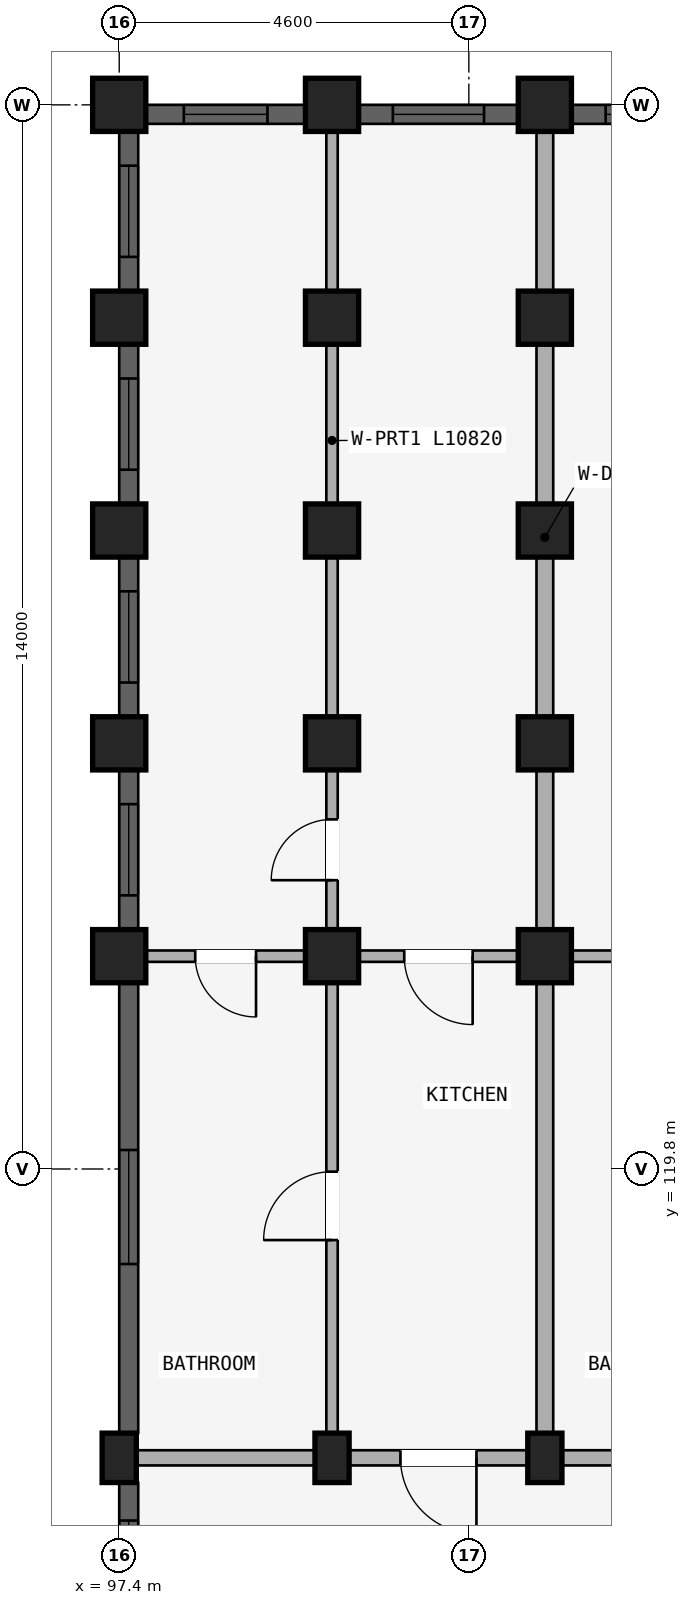
"""IFC4 building model, lengths in metres.
Left out: names, types, materials, properties, quantities, classifications, styles, units other than length and angle.
Written with IfcOpenShell. Run it as: python <this file> out.ifc"""

import sys

from ifc_helpers import new_model, si_unit, direction, frame, frame_2d, origin, origin_2d, place, context, subcontext, project, spatial, rectangle, extrude, element, fill, save


model = new_model("IFC4")
c1 = context("Model", 3, precision=1e-05, world=origin(), true_north=direction((0.0, 1.0)))
c2 = subcontext(c1, "Body", "Model", "MODEL_VIEW")
j1 = project(units=[si_unit("LENGTHUNIT", "METRE"), si_unit("PLANEANGLEUNIT", "RADIAN")], contexts=[c1])
p1 = place(None, origin())
s1 = spatial("IfcSite", under=j1, at=p1, CompositionType="ELEMENT")
p2 = place(p1, origin())
s2 = spatial("IfcBuilding", under=s1, at=p2, CompositionType="ELEMENT")
p3 = place(p2, frame((0.0, 0.0, 27.6)))
s3 = spatial("IfcBuildingStorey", under=s2, at=p3, CompositionType="ELEMENT", Elevation=27.6)
p4 = place(p3, frame((103.0, 116.0, 0.0), z_axis=(0.0, 0.0, 1.0), x_axis=(1.0, 0.0, 0.0)))
e1 = element("IfcColumn", 1, at=p4, inside=s3, PredefinedType="COLUMN", context=c2, shape_type="SweptSolid", body=[
    extrude(rectangle(XDim=0.45, YDim=0.65, at=origin_2d()), origin(), (0.0, 0.0, 1.0), 2.93),
])
for number, where, z_axis, x_axis in (
    (2, (103.0, 122.6, 0.0), (0.0, 0.0, 1.0), (1.0, 0.0, 0.0)),
    (3, (103.0, 125.4, 0.0), (0.0, 0.0, 1.0), (1.0, 0.0, 0.0)),
    (4, (103.0, 128.2, 0.0), (0.0, 0.0, 1.0), (1.0, 0.0, 0.0)),
    (5, (103.0, 131.0, 0.0), (0.0, 0.0, 1.0), (1.0, 0.0, 0.0)),
):
    element("IfcColumn", number, at=place(p3, frame(where, z_axis=z_axis, x_axis=x_axis)), inside=s3, PredefinedType="COLUMN", context=c2, shape_type="SweptSolid", body=[
        extrude(rectangle(XDim=0.7, YDim=0.7, at=origin_2d()), origin(), (0.0, 0.0, 1.0), 2.93),
    ])
p5 = place(p3, frame((103.0, 133.8, 0.0), z_axis=(0.0, 0.0, 1.0), x_axis=(1.0, 0.0, 0.0)))
e6 = element("IfcColumn", 6, at=p5, inside=s3, PredefinedType="COLUMN", context=c2, shape_type="SweptSolid", body=[
    extrude(rectangle(XDim=0.7, YDim=0.7, at=origin_2d()), origin(), (0.0, 0.0, 1.0), 2.97),
])
p6 = place(p3, frame((100.2, 116.0, 0.0), z_axis=(0.0, 0.0, 1.0), x_axis=(1.0, 0.0, 0.0)))
e7 = element("IfcColumn", 7, at=p6, inside=s3, PredefinedType="COLUMN", context=c2, shape_type="SweptSolid", body=[
    extrude(rectangle(XDim=0.45, YDim=0.65, at=origin_2d()), origin(), (0.0, 0.0, 1.0), 2.93),
])
for number, where, z_axis, x_axis in (
    (8, (100.2, 122.6, 0.0), (0.0, 0.0, 1.0), (1.0, 0.0, 0.0)),
    (9, (100.2, 125.4, 0.0), (0.0, 0.0, 1.0), (1.0, 0.0, 0.0)),
    (10, (100.2, 128.2, 0.0), (0.0, 0.0, 1.0), (1.0, 0.0, 0.0)),
    (11, (100.2, 131.0, 0.0), (0.0, 0.0, 1.0), (1.0, 0.0, 0.0)),
):
    element("IfcColumn", number, at=place(p3, frame(where, z_axis=z_axis, x_axis=x_axis)), inside=s3, PredefinedType="COLUMN", context=c2, shape_type="SweptSolid", body=[
        extrude(rectangle(XDim=0.7, YDim=0.7, at=origin_2d()), origin(), (0.0, 0.0, 1.0), 2.93),
    ])
p7 = place(p3, frame((100.2, 133.8, 0.0), z_axis=(0.0, 0.0, 1.0), x_axis=(1.0, 0.0, 0.0)))
e12 = element("IfcColumn", 12, at=p7, inside=s3, PredefinedType="COLUMN", context=c2, shape_type="SweptSolid", body=[
    extrude(rectangle(XDim=0.7, YDim=0.7, at=origin_2d()), origin(), (0.0, 0.0, 1.0), 2.97),
])
p8 = place(p3, frame((97.4, 116.0, 0.0), z_axis=(0.0, 0.0, 1.0), x_axis=(1.0, 0.0, 0.0)))
e13 = element("IfcColumn", 13, at=p8, inside=s3, PredefinedType="COLUMN", context=c2, shape_type="SweptSolid", body=[
    extrude(rectangle(XDim=0.45, YDim=0.65, at=origin_2d()), origin(), (0.0, 0.0, 1.0), 2.93),
])
for number, where, z_axis, x_axis in (
    (14, (97.4, 122.6, 0.0), (0.0, 0.0, 1.0), (1.0, 0.0, 0.0)),
    (15, (97.4, 125.4, 0.0), (0.0, 0.0, 1.0), (1.0, 0.0, 0.0)),
    (16, (97.4, 128.2, 0.0), (0.0, 0.0, 1.0), (1.0, 0.0, 0.0)),
    (17, (97.4, 131.0, 0.0), (0.0, 0.0, 1.0), (1.0, 0.0, 0.0)),
):
    element("IfcColumn", number, at=place(p3, frame(where, z_axis=z_axis, x_axis=x_axis)), inside=s3, PredefinedType="COLUMN", context=c2, shape_type="SweptSolid", body=[
        extrude(rectangle(XDim=0.7, YDim=0.7, at=origin_2d()), origin(), (0.0, 0.0, 1.0), 2.93),
    ])
p9 = place(p3, frame((97.4, 133.8, 0.0), z_axis=(0.0, 0.0, 1.0), x_axis=(1.0, 0.0, 0.0)))
e18 = element("IfcColumn", 18, at=p9, inside=s3, PredefinedType="COLUMN", context=c2, shape_type="SweptSolid", body=[
    extrude(rectangle(XDim=0.7, YDim=0.7, at=origin_2d()), origin(), (0.0, 0.0, 1.0), 2.97),
])
p10 = place(p3, frame((105.8, 116.0, 0.0), z_axis=(0.0, 0.0, 1.0), x_axis=(-1.0, 0.0, 0.0)))
e19 = element("IfcWall", 19, at=p10, inside=s3, PredefinedType="STANDARD", context=c2, shape_type="SweptSolid", body=[
    extrude(rectangle(XDim=2.8, YDim=0.2, at=frame_2d((1.4, 0.0))), origin(), (0.0, 0.0, 1.0), 2.372),
])
p11 = place(p3, frame((105.72, 122.6, 0.0), z_axis=(0.0, 0.0, 1.0), x_axis=(-1.0, 0.0, 0.0)))
e20 = element("IfcWall", 20, at=p11, inside=s3, PredefinedType="PLUMBINGWALL", context=c2, shape_type="SweptSolid", body=[
    extrude(rectangle(XDim=2.64, YDim=0.15, at=frame_2d((1.32, 0.0))), origin(), (0.0, 0.0, 1.0), 2.372),
])
p12 = place(p11, frame((0.92, 0.0, 0.0)))
e21 = element("IfcOpeningElement", 21, at=p12, cuts=e20, PredefinedType="OPENING", context=c2, shape_type="SweptSolid", body=[
    extrude(rectangle(XDim=0.8, YDim=2.1, at=frame_2d((0.4, 1.05))), frame((0.0, 0.085, 0.0), z_axis=(0.0, -1.0, 0.0), x_axis=(1.0, 0.0, 0.0)), (0.0, 0.0, 1.0), 0.17),
])
p13 = place(p3, frame((103.0, 116.0, 0.0), z_axis=(0.0, 0.0, 1.0), x_axis=(-1.0, 0.0, 0.0)))
e22 = element("IfcWall", 22, at=p13, inside=s3, PredefinedType="STANDARD", context=c2, shape_type="SweptSolid", body=[
    extrude(rectangle(XDim=2.8, YDim=0.2, at=frame_2d((1.4, 0.0))), origin(), (0.0, 0.0, 1.0), 2.372),
])
p14 = place(p13, frame((0.9, 0.0, 0.0)))
e23 = element("IfcOpeningElement", 23, at=p14, cuts=e22, PredefinedType="OPENING", context=c2, shape_type="SweptSolid", body=[
    extrude(rectangle(XDim=1.0, YDim=2.15, at=frame_2d((0.5, 1.075))), frame((0.0, 0.11, 0.0), z_axis=(0.0, -1.0, 0.0), x_axis=(1.0, 0.0, 0.0)), (0.0, 0.0, 1.0), 0.22),
])
p15 = place(p3, frame((102.92, 122.6, 0.0), z_axis=(0.0, 0.0, 1.0), x_axis=(-1.0, 0.0, 0.0)))
e24 = element("IfcWall", 24, at=p15, inside=s3, PredefinedType="PLUMBINGWALL", context=c2, shape_type="SweptSolid", body=[
    extrude(rectangle(XDim=2.64, YDim=0.15, at=frame_2d((1.32, 0.0))), origin(), (0.0, 0.0, 1.0), 2.372),
])
p16 = place(p15, frame((0.87, 0.0, 0.0)))
e25 = element("IfcOpeningElement", 25, at=p16, cuts=e24, PredefinedType="OPENING", context=c2, shape_type="SweptSolid", body=[
    extrude(rectangle(XDim=0.9, YDim=2.1, at=frame_2d((0.45, 1.05))), frame((0.0, 0.085, 0.0), z_axis=(0.0, -1.0, 0.0), x_axis=(1.0, 0.0, 0.0)), (0.0, 0.0, 1.0), 0.17),
])
p17 = place(p3, frame((100.2, 116.0, 0.0), z_axis=(0.0, 0.0, 1.0), x_axis=(-1.0, 0.0, 0.0)))
e26 = element("IfcWall", 26, at=p17, inside=s3, PredefinedType="STANDARD", context=c2, shape_type="SweptSolid", body=[
    extrude(rectangle(XDim=2.8, YDim=0.2, at=frame_2d((1.4, 0.0))), origin(), (0.0, 0.0, 1.0), 2.372),
])
p18 = place(p3, frame((100.12, 122.6, 0.0), z_axis=(0.0, 0.0, 1.0), x_axis=(-1.0, 0.0, 0.0)))
e27 = element("IfcWall", 27, at=p18, inside=s3, PredefinedType="PLUMBINGWALL", context=c2, shape_type="SweptSolid", body=[
    extrude(rectangle(XDim=2.64, YDim=0.15, at=frame_2d((1.32, 0.0))), origin(), (0.0, 0.0, 1.0), 2.372),
])
p19 = place(p18, frame((0.92, 0.0, 0.0)))
e28 = element("IfcOpeningElement", 28, at=p19, cuts=e27, PredefinedType="OPENING", context=c2, shape_type="SweptSolid", body=[
    extrude(rectangle(XDim=0.8, YDim=2.1, at=frame_2d((0.4, 1.05))), frame((0.0, 0.085, 0.0), z_axis=(0.0, -1.0, 0.0), x_axis=(1.0, 0.0, 0.0)), (0.0, 0.0, 1.0), 0.17),
])
p20 = place(p3, frame((103.0, 116.05, 0.0), z_axis=(0.0, 0.0, 1.0), x_axis=(0.0, 1.0, 0.0)))
e29 = element("IfcWall", 29, at=p20, inside=s3, PredefinedType="STANDARD", context=c2, shape_type="SweptSolid", body=[
    extrude(rectangle(XDim=6.53, YDim=0.22, at=frame_2d((3.265, 0.0))), origin(), (0.0, 0.0, 1.0), 2.372),
])
p21 = place(p3, frame((103.0, 122.7, 0.0), z_axis=(0.0, 0.0, 1.0), x_axis=(0.0, 1.0, 0.0)))
e30 = element("IfcWall", 30, at=p21, inside=s3, PredefinedType="STANDARD", context=c2, shape_type="SweptSolid", body=[
    extrude(rectangle(XDim=10.82, YDim=0.22, at=frame_2d((5.41, 0.0))), origin(), (0.0, 0.0, 1.0), 2.372),
])
p22 = place(p3, frame((100.2, 116.05, 0.0), z_axis=(0.0, 0.0, 1.0), x_axis=(0.0, 1.0, 0.0)))
e31 = element("IfcWall", 31, at=p22, inside=s3, PredefinedType="PARTITIONING", context=c2, shape_type="SweptSolid", body=[
    extrude(rectangle(XDim=6.53, YDim=0.15, at=frame_2d((3.265, 0.0))), origin(), (0.0, 0.0, 1.0), 2.372),
])
p23 = place(p22, frame((2.815, 0.0, 0.0)))
e32 = element("IfcOpeningElement", 32, at=p23, cuts=e31, PredefinedType="OPENING", context=c2, shape_type="SweptSolid", body=[
    extrude(rectangle(XDim=0.9, YDim=2.1, at=frame_2d((0.45, 1.05))), frame((0.0, 0.085, 0.0), z_axis=(0.0, -1.0, 0.0), x_axis=(1.0, 0.0, 0.0)), (0.0, 0.0, 1.0), 0.17),
])
p24 = place(p3, frame((100.2, 122.7, 0.0), z_axis=(0.0, 0.0, 1.0), x_axis=(0.0, 1.0, 0.0)))
e33 = element("IfcWall", 33, at=p24, inside=s3, PredefinedType="PARTITIONING", context=c2, shape_type="SweptSolid", body=[
    extrude(rectangle(XDim=10.82, YDim=0.15, at=frame_2d((5.41, 0.0))), origin(), (0.0, 0.0, 1.0), 2.372),
])
p25 = place(p24, frame((0.899, 0.0, 0.0)))
e34 = element("IfcOpeningElement", 34, at=p25, cuts=e33, PredefinedType="OPENING", context=c2, shape_type="SweptSolid", body=[
    extrude(rectangle(XDim=0.8, YDim=2.1, at=frame_2d((0.4, 1.05))), frame((0.0, 0.085, 0.0), z_axis=(0.0, -1.0, 0.0), x_axis=(1.0, 0.0, 0.0)), (0.0, 0.0, 1.0), 0.17),
])
p26 = place(p3, frame((105.447, 133.675, 0.0), z_axis=(0.0, 0.0, 1.0), x_axis=(-1.0, 0.0, 0.0)))
e35 = element("IfcWall", 35, at=p26, inside=s3, PredefinedType="STANDARD", context=c2, shape_type="SweptSolid", body=[
    extrude(rectangle(XDim=2.093, YDim=0.25, at=frame_2d((1.046, 0.0))), origin(), (0.0, 0.0, 1.0), 2.48),
])
p27 = place(p26, frame((0.447, 0.0, 0.78)))
e36 = element("IfcOpeningElement", 36, at=p27, cuts=e35, PredefinedType="OPENING", context=c2, shape_type="SweptSolid", body=[
    extrude(rectangle(XDim=1.2, YDim=1.5, at=frame_2d((0.6, 0.75))), frame((0.0, 0.135, 0.0), z_axis=(0.0, -1.0, 0.0), x_axis=(1.0, 0.0, 0.0)), (0.0, 0.0, 1.0), 0.27),
])
p28 = place(p3, frame((102.646, 133.675, 0.0), z_axis=(0.0, 0.0, 1.0), x_axis=(-1.0, 0.0, 0.0)))
e37 = element("IfcWall", 37, at=p28, inside=s3, PredefinedType="STANDARD", context=c2, shape_type="SweptSolid", body=[
    extrude(rectangle(XDim=2.093, YDim=0.25, at=frame_2d((1.046, 0.0))), origin(), (0.0, 0.0, 1.0), 2.48),
])
p29 = place(p28, frame((0.447, 0.0, 0.78)))
e38 = element("IfcOpeningElement", 38, at=p29, cuts=e37, PredefinedType="OPENING", context=c2, shape_type="SweptSolid", body=[
    extrude(rectangle(XDim=1.2, YDim=1.5, at=frame_2d((0.6, 0.75))), frame((0.0, 0.135, 0.0), z_axis=(0.0, -1.0, 0.0), x_axis=(1.0, 0.0, 0.0)), (0.0, 0.0, 1.0), 0.27),
])
p30 = place(p3, frame((99.846, 133.675, 0.0), z_axis=(0.0, 0.0, 1.0), x_axis=(-1.0, 0.0, 0.0)))
e39 = element("IfcWall", 39, at=p30, inside=s3, PredefinedType="STANDARD", context=c2, shape_type="SweptSolid", body=[
    extrude(rectangle(XDim=2.093, YDim=0.25, at=frame_2d((1.046, 0.0))), origin(), (0.0, 0.0, 1.0), 2.48),
])
p31 = place(p30, frame((0.497, 0.0, 0.83)))
e40 = element("IfcOpeningElement", 40, at=p31, cuts=e39, PredefinedType="OPENING", context=c2, shape_type="SweptSolid", body=[
    extrude(rectangle(XDim=1.1, YDim=1.45, at=frame_2d((0.55, 0.725))), frame((0.0, 0.135, 0.0), z_axis=(0.0, -1.0, 0.0), x_axis=(1.0, 0.0, 0.0)), (0.0, 0.0, 1.0), 0.27),
])
p32 = place(p3, frame((97.525, 113.928, 0.0), z_axis=(0.0, 0.0, 1.0), x_axis=(0.0, 1.0, 0.0)))
e41 = element("IfcWall", 41, at=p32, inside=s3, PredefinedType="STANDARD", context=c2, shape_type="SweptSolid", body=[
    extrude(rectangle(XDim=1.743, YDim=0.25, at=frame_2d((0.872, 0.0))), origin(), (0.0, 0.0, 1.0), 2.372),
])
p33 = place(p32, frame((0.497, 0.0, 0.88)))
e42 = element("IfcOpeningElement", 42, at=p33, cuts=e41, PredefinedType="OPENING", context=c2, shape_type="SweptSolid", body=[
    extrude(rectangle(XDim=0.75, YDim=1.05, at=frame_2d((0.375, 0.525))), frame((0.0, 0.135, 0.0), z_axis=(0.0, -1.0, 0.0), x_axis=(1.0, 0.0, 0.0)), (0.0, 0.0, 1.0), 0.27),
])
p34 = place(p3, frame((97.525, 116.329, 0.0), z_axis=(0.0, 0.0, 1.0), x_axis=(0.0, 1.0, 0.0)))
e43 = element("IfcWall", 43, at=p34, inside=s3, PredefinedType="STANDARD", context=c2, shape_type="SweptSolid", body=[
    extrude(rectangle(XDim=5.918, YDim=0.25, at=frame_2d((2.959, 0.0))), origin(), (0.0, 0.0, 1.0), 2.372),
])
p35 = place(p34, frame((2.221, 0.0, 0.522)))
e44 = element("IfcOpeningElement", 44, at=p35, cuts=e43, PredefinedType="OPENING", context=c2, shape_type="SweptSolid", body=[
    extrude(rectangle(XDim=1.5, YDim=1.65, at=frame_2d((0.75, 0.825))), frame((0.0, 0.135, 0.0), z_axis=(0.0, -1.0, 0.0), x_axis=(1.0, 0.0, 0.0)), (0.0, 0.0, 1.0), 0.27),
])
p36 = place(p3, frame((97.525, 122.954, 0.0), z_axis=(0.0, 0.0, 1.0), x_axis=(0.0, 1.0, 0.0)))
e45 = element("IfcWall", 45, at=p36, inside=s3, PredefinedType="STANDARD", context=c2, shape_type="SweptSolid", body=[
    extrude(rectangle(XDim=2.093, YDim=0.25, at=frame_2d((1.046, 0.0))), origin(), (0.0, 0.0, 1.0), 2.372),
])
p37 = place(p36, frame((0.447, 0.0, 0.672)))
e46 = element("IfcOpeningElement", 46, at=p37, cuts=e45, PredefinedType="OPENING", context=c2, shape_type="SweptSolid", body=[
    extrude(rectangle(XDim=1.2, YDim=1.5, at=frame_2d((0.6, 0.75))), frame((0.0, 0.135, 0.0), z_axis=(0.0, -1.0, 0.0), x_axis=(1.0, 0.0, 0.0)), (0.0, 0.0, 1.0), 0.27),
])
p38 = place(p3, frame((97.525, 125.753, 0.0), z_axis=(0.0, 0.0, 1.0), x_axis=(0.0, 1.0, 0.0)))
e47 = element("IfcWall", 47, at=p38, inside=s3, PredefinedType="STANDARD", context=c2, shape_type="SweptSolid", body=[
    extrude(rectangle(XDim=2.093, YDim=0.25, at=frame_2d((1.046, 0.0))), origin(), (0.0, 0.0, 1.0), 2.372),
])
p39 = place(p38, frame((0.447, 0.0, 0.672)))
e48 = element("IfcOpeningElement", 48, at=p39, cuts=e47, PredefinedType="OPENING", context=c2, shape_type="SweptSolid", body=[
    extrude(rectangle(XDim=1.2, YDim=1.5, at=frame_2d((0.6, 0.75))), frame((0.0, 0.135, 0.0), z_axis=(0.0, -1.0, 0.0), x_axis=(1.0, 0.0, 0.0)), (0.0, 0.0, 1.0), 0.27),
])
p40 = place(p3, frame((97.525, 128.553, 0.0), z_axis=(0.0, 0.0, 1.0), x_axis=(0.0, 1.0, 0.0)))
e49 = element("IfcWall", 49, at=p40, inside=s3, PredefinedType="STANDARD", context=c2, shape_type="SweptSolid", body=[
    extrude(rectangle(XDim=2.093, YDim=0.25, at=frame_2d((1.046, 0.0))), origin(), (0.0, 0.0, 1.0), 2.372),
])
p41 = place(p40, frame((0.447, 0.0, 0.672)))
e50 = element("IfcOpeningElement", 50, at=p41, cuts=e49, PredefinedType="OPENING", context=c2, shape_type="SweptSolid", body=[
    extrude(rectangle(XDim=1.2, YDim=1.5, at=frame_2d((0.6, 0.75))), frame((0.0, 0.135, 0.0), z_axis=(0.0, -1.0, 0.0), x_axis=(1.0, 0.0, 0.0)), (0.0, 0.0, 1.0), 0.27),
])
p42 = place(p3, frame((97.525, 131.354, 0.0), z_axis=(0.0, 0.0, 1.0), x_axis=(0.0, 1.0, 0.0)))
e51 = element("IfcWall", 51, at=p42, inside=s3, PredefinedType="STANDARD", context=c2, shape_type="SweptSolid", body=[
    extrude(rectangle(XDim=2.093, YDim=0.25, at=frame_2d((1.046, 0.0))), origin(), (0.0, 0.0, 1.0), 2.412),
])
p43 = place(p42, frame((0.447, 0.0, 0.712)))
e52 = element("IfcOpeningElement", 52, at=p43, cuts=e51, PredefinedType="OPENING", context=c2, shape_type="SweptSolid", body=[
    extrude(rectangle(XDim=1.2, YDim=1.5, at=frame_2d((0.6, 0.75))), frame((0.0, 0.135, 0.0), z_axis=(0.0, -1.0, 0.0), x_axis=(1.0, 0.0, 0.0)), (0.0, 0.0, 1.0), 0.27),
])
p44 = place(p27, origin())
e53 = element("IfcWindow", 53, at=p44, inside=s3, PartitioningType="SINGLE_PANEL", PredefinedType="WINDOW", context=c2, shape_type="SweptSolid", body=[
    extrude(rectangle(XDim=1.2, YDim=1.5, at=frame_2d((0.6, 0.75))), frame((0.0, 0.03, 0.0), z_axis=(0.0, -1.0, 0.0), x_axis=(1.0, 0.0, 0.0)), (0.0, 0.0, 1.0), 0.06),
])
fill(e36, e53)
p45 = place(p29, origin())
e54 = element("IfcWindow", 54, at=p45, inside=s3, PartitioningType="SINGLE_PANEL", PredefinedType="WINDOW", context=c2, shape_type="SweptSolid", body=[
    extrude(rectangle(XDim=1.2, YDim=1.5, at=frame_2d((0.6, 0.75))), frame((0.0, 0.03, 0.0), z_axis=(0.0, -1.0, 0.0), x_axis=(1.0, 0.0, 0.0)), (0.0, 0.0, 1.0), 0.06),
])
fill(e38, e54)
p46 = place(p31, origin())
e55 = element("IfcWindow", 55, at=p46, inside=s3, PartitioningType="SINGLE_PANEL", PredefinedType="WINDOW", context=c2, shape_type="SweptSolid", body=[
    extrude(rectangle(XDim=1.1, YDim=1.45, at=frame_2d((0.55, 0.725))), frame((0.0, 0.03, 0.0), z_axis=(0.0, -1.0, 0.0), x_axis=(1.0, 0.0, 0.0)), (0.0, 0.0, 1.0), 0.06),
])
fill(e40, e55)
p47 = place(p33, origin())
e56 = element("IfcWindow", 56, at=p47, inside=s3, PartitioningType="SINGLE_PANEL", PredefinedType="WINDOW", context=c2, shape_type="SweptSolid", body=[
    extrude(rectangle(XDim=0.75, YDim=1.05, at=frame_2d((0.375, 0.525))), frame((0.0, 0.03, 0.0), z_axis=(0.0, -1.0, 0.0), x_axis=(1.0, 0.0, 0.0)), (0.0, 0.0, 1.0), 0.06),
])
fill(e42, e56)
p48 = place(p35, origin())
e57 = element("IfcWindow", 57, at=p48, inside=s3, PartitioningType="DOUBLE_PANEL_VERTICAL", PredefinedType="WINDOW", context=c2, shape_type="SweptSolid", body=[
    extrude(rectangle(XDim=1.5, YDim=1.65, at=frame_2d((0.75, 0.825))), frame((0.0, 0.03, 0.0), z_axis=(0.0, -1.0, 0.0), x_axis=(1.0, 0.0, 0.0)), (0.0, 0.0, 1.0), 0.06),
])
fill(e44, e57)
p49 = place(p37, origin())
e58 = element("IfcWindow", 58, at=p49, inside=s3, PartitioningType="SINGLE_PANEL", PredefinedType="WINDOW", context=c2, shape_type="SweptSolid", body=[
    extrude(rectangle(XDim=1.2, YDim=1.5, at=frame_2d((0.6, 0.75))), frame((0.0, 0.03, 0.0), z_axis=(0.0, -1.0, 0.0), x_axis=(1.0, 0.0, 0.0)), (0.0, 0.0, 1.0), 0.06),
])
fill(e46, e58)
p50 = place(p39, origin())
e59 = element("IfcWindow", 59, at=p50, inside=s3, PartitioningType="SINGLE_PANEL", PredefinedType="WINDOW", context=c2, shape_type="SweptSolid", body=[
    extrude(rectangle(XDim=1.2, YDim=1.5, at=frame_2d((0.6, 0.75))), frame((0.0, 0.03, 0.0), z_axis=(0.0, -1.0, 0.0), x_axis=(1.0, 0.0, 0.0)), (0.0, 0.0, 1.0), 0.06),
])
fill(e48, e59)
p51 = place(p41, origin())
e60 = element("IfcWindow", 60, at=p51, inside=s3, PartitioningType="SINGLE_PANEL", PredefinedType="WINDOW", context=c2, shape_type="SweptSolid", body=[
    extrude(rectangle(XDim=1.2, YDim=1.5, at=frame_2d((0.6, 0.75))), frame((0.0, 0.03, 0.0), z_axis=(0.0, -1.0, 0.0), x_axis=(1.0, 0.0, 0.0)), (0.0, 0.0, 1.0), 0.06),
])
fill(e50, e60)
p52 = place(p43, origin())
e61 = element("IfcWindow", 61, at=p52, inside=s3, PartitioningType="SINGLE_PANEL", PredefinedType="WINDOW", context=c2, shape_type="SweptSolid", body=[
    extrude(rectangle(XDim=1.2, YDim=1.5, at=frame_2d((0.6, 0.75))), frame((0.0, 0.03, 0.0), z_axis=(0.0, -1.0, 0.0), x_axis=(1.0, 0.0, 0.0)), (0.0, 0.0, 1.0), 0.06),
])
fill(e52, e61)
p53 = place(p16, frame((0.9, 0.0, 0.0), z_axis=(0.0, 0.0, 1.0), x_axis=(-1.0, 0.0, 0.0)))
e62 = element("IfcDoor", 62, at=p53, inside=s3, OperationType="SINGLE_SWING_RIGHT", PredefinedType="DOOR", context=c2, shape_type="SweptSolid", body=[
    extrude(rectangle(XDim=0.9, YDim=2.1, at=frame_2d((0.45, 1.05))), frame((0.0, 0.025, 0.0), z_axis=(0.0, -1.0, 0.0), x_axis=(1.0, 0.0, 0.0)), (0.0, 0.0, 1.0), 0.05),
])
fill(e25, e62)
p54 = place(p14, origin())
e63 = element("IfcDoor", 63, at=p54, inside=s3, OperationType="SINGLE_SWING_LEFT", PredefinedType="DOOR", context=c2, shape_type="SweptSolid", body=[
    extrude(rectangle(XDim=1.0, YDim=2.15, at=frame_2d((0.5, 1.075))), frame((0.0, 0.025, 0.0), z_axis=(0.0, -1.0, 0.0), x_axis=(1.0, 0.0, 0.0)), (0.0, 0.0, 1.0), 0.05),
])
fill(e23, e63)
p55 = place(p19, frame((0.8, 0.0, 0.0), z_axis=(0.0, 0.0, 1.0), x_axis=(-1.0, 0.0, 0.0)))
e64 = element("IfcDoor", 64, at=p55, inside=s3, OperationType="SINGLE_SWING_RIGHT", PredefinedType="DOOR", context=c2, shape_type="SweptSolid", body=[
    extrude(rectangle(XDim=0.8, YDim=2.1, at=frame_2d((0.4, 1.05))), frame((0.0, 0.025, 0.0), z_axis=(0.0, -1.0, 0.0), x_axis=(1.0, 0.0, 0.0)), (0.0, 0.0, 1.0), 0.05),
])
fill(e28, e64)
p56 = place(p23, frame((0.9, 0.0, 0.0), z_axis=(0.0, 0.0, 1.0), x_axis=(-1.0, 0.0, 0.0)))
e65 = element("IfcDoor", 65, at=p56, inside=s3, OperationType="SINGLE_SWING_RIGHT", PredefinedType="DOOR", context=c2, shape_type="SweptSolid", body=[
    extrude(rectangle(XDim=0.9, YDim=2.1, at=frame_2d((0.45, 1.05))), frame((0.0, 0.025, 0.0), z_axis=(0.0, -1.0, 0.0), x_axis=(1.0, 0.0, 0.0)), (0.0, 0.0, 1.0), 0.05),
])
fill(e32, e65)
p57 = place(p25, origin())
e66 = element("IfcDoor", 66, at=p57, inside=s3, OperationType="SINGLE_SWING_LEFT", PredefinedType="DOOR", context=c2, shape_type="SweptSolid", body=[
    extrude(rectangle(XDim=0.8, YDim=2.1, at=frame_2d((0.4, 1.05))), frame((0.0, 0.025, 0.0), z_axis=(0.0, -1.0, 0.0), x_axis=(1.0, 0.0, 0.0)), (0.0, 0.0, 1.0), 0.05),
])
fill(e34, e66)
save(model, sys.argv[1])
